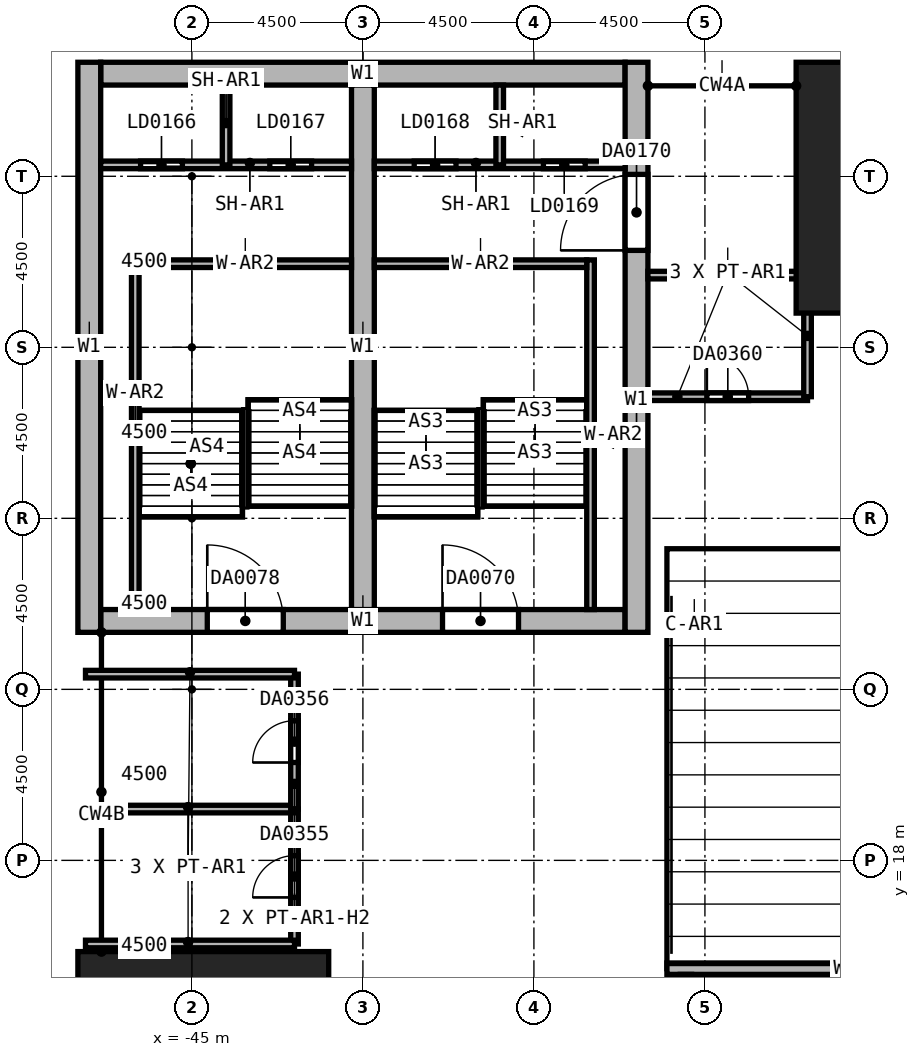
"""IFC4 building model, lengths in metres.
Left out: names, types, materials, properties, quantities, classifications, styles, units other than length and angle.
Written with IfcOpenShell. Run it as: python <this file> out.ifc"""

import sys

from ifc_helpers import new_model, si_unit, direction, frame, frame_2d, origin, origin_2d, place, context, subcontext, project, spatial, rectangle, hollow_rectangle, extrude, element, fill, save


model = new_model("IFC4")
c1 = context("Model", 3, precision=1e-05, world=origin(), true_north=direction((0.0, 1.0)))
c2 = subcontext(c1, "Body", "Model", "MODEL_VIEW")
j1 = project(units=[si_unit("LENGTHUNIT", "METRE"), si_unit("PLANEANGLEUNIT", "RADIAN")], contexts=[c1])
p1 = place(None, origin())
s1 = spatial("IfcSite", under=j1, at=p1, CompositionType="ELEMENT")
p2 = place(p1, origin())
s2 = spatial("IfcBuilding", under=s1, at=p2, CompositionType="ELEMENT")
p3 = place(p2, frame((0.0, 0.0, 12.0)))
s3 = spatial("IfcBuildingStorey", under=s2, at=p3, CompositionType="ELEMENT", Elevation=12.0)
for number, where, z_axis, x_axis in (
    (1, (-27.0, 35.7, 0.0), (0.0, 0.0, 1.0), (1.0, 0.0, 0.0)),
    (2, (-44.7, 13.5, 0.0), (0.0, 0.0, 1.0), (0.0, 1.0, 0.0)),
):
    element("IfcColumn", number, at=place(p3, frame(where, z_axis=z_axis, x_axis=x_axis)), inside=s3, PredefinedType="COLUMN", context=c2, shape_type="SweptSolid", body=[
        extrude(rectangle(XDim=4.2, YDim=6.6, at=origin_2d()), origin(), (0.0, 0.0, 1.0), 7.0),
    ])
p4 = place(p3, frame((-47.4, 38.7, 0.0), z_axis=(0.0, 0.0, 1.0), x_axis=(1.0, 0.0, 0.0)))
e3 = element("IfcWall", 3, at=p4, inside=s3, PredefinedType="SHEAR", context=c2, shape_type="SweptSolid", body=[
    extrude(rectangle(XDim=13.8, YDim=0.6, at=frame_2d((6.9, 0.0))), origin(), (0.0, 0.0, 1.0), 7.0),
])
p5 = place(p3, frame((-47.4, 24.3, 0.0), z_axis=(0.0, 0.0, 1.0), x_axis=(1.0, 0.0, 0.0)))
e4 = element("IfcWall", 4, at=p5, inside=s3, PredefinedType="SHEAR", context=c2, shape_type="SweptSolid", body=[
    extrude(rectangle(XDim=13.8, YDim=0.6, at=frame_2d((6.9, 0.0))), origin(), (0.0, 0.0, 1.0), 7.0),
])
p6 = place(p5, frame((8.995, 0.0, 0.0)))
e5 = element("IfcOpeningElement", 5, at=p6, cuts=e4, PredefinedType="OPENING", context=c2, shape_type="SweptSolid", body=[
    extrude(rectangle(XDim=2.0, YDim=2.4, at=frame_2d((1.0, 1.2))), frame((0.0, 0.3, 0.0), z_axis=(0.0, -1.0, 0.0), x_axis=(1.0, 0.0, 0.0)), (0.0, 0.0, 1.0), 0.6),
])
p7 = place(p5, frame((2.805, 0.0, 0.0)))
e6 = element("IfcOpeningElement", 6, at=p7, cuts=e4, PredefinedType="OPENING", context=c2, shape_type="SweptSolid", body=[
    extrude(rectangle(XDim=2.0, YDim=2.4, at=frame_2d((1.0, 1.2))), frame((0.0, 0.3, 0.0), z_axis=(0.0, -1.0, 0.0), x_axis=(1.0, 0.0, 0.0)), (0.0, 0.0, 1.0), 0.6),
])
p8 = place(p3, frame((-47.7, 24.0, 0.0), z_axis=(0.0, 0.0, 1.0), x_axis=(0.0, 1.0, 0.0)))
e7 = element("IfcWall", 7, at=p8, inside=s3, PredefinedType="SHEAR", context=c2, shape_type="SweptSolid", body=[
    extrude(rectangle(XDim=15.0, YDim=0.6, at=frame_2d((7.5, 0.0))), origin(), (0.0, 0.0, 1.0), 7.0),
])
p9 = place(p3, frame((-33.3, 24.0, 0.0), z_axis=(0.0, 0.0, 1.0), x_axis=(0.0, 1.0, 0.0)))
e8 = element("IfcWall", 8, at=p9, inside=s3, PredefinedType="SHEAR", context=c2, shape_type="SweptSolid", body=[
    extrude(rectangle(XDim=15.0, YDim=0.6, at=frame_2d((7.5, 0.0))), origin(), (0.0, 0.0, 1.0), 7.0),
])
p10 = place(p9, frame((10.05, 0.0, 0.0)))
e9 = element("IfcOpeningElement", 9, at=p10, cuts=e8, PredefinedType="OPENING", context=c2, shape_type="SweptSolid", body=[
    extrude(rectangle(XDim=2.0, YDim=2.4, at=frame_2d((1.0, 1.2))), frame((0.0, 0.3, 0.0), z_axis=(0.0, -1.0, 0.0), x_axis=(1.0, 0.0, 0.0)), (0.0, 0.0, 1.0), 0.6),
])
p11 = place(p3, frame((-40.5, 24.6, 0.0), z_axis=(0.0, 0.0, 1.0), x_axis=(0.0, 1.0, 0.0)))
e10 = element("IfcWall", 10, at=p11, inside=s3, PredefinedType="SHEAR", context=c2, shape_type="SweptSolid", body=[
    extrude(rectangle(XDim=13.8, YDim=0.6, at=frame_2d((6.9, 0.0))), origin(), (0.0, 0.0, 1.0), 7.0),
])
p12 = place(p3, frame((-32.5, 15.15, 0.0), z_axis=(0.0, 0.0, 1.0), x_axis=(1.0, 0.0, 0.0)))
e11 = element("IfcWall", 11, at=p12, inside=s3, PredefinedType="SOLIDWALL", context=c2, shape_type="SweptSolid", body=[
    extrude(rectangle(XDim=10.6, YDim=0.3, at=frame_2d((5.3, 0.0))), origin(), (0.0, 0.0, 1.0), 2.125),
])
p13 = place(p3, frame((-32.0, 15.0, 0.0), z_axis=(0.0, 0.0, 1.0), x_axis=(0.0, -1.0, 0.0)))
e12 = element("IfcWall", 12, at=p13, inside=s3, PredefinedType="SOLIDWALL", context=c2, shape_type="SweptSolid", body=[
    extrude(rectangle(XDim=13.05, YDim=0.3, at=frame_2d((6.525, 0.0))), origin(), (0.0, 0.0, 1.0), 2.0),
])
p14 = place(p3, frame((-31.78, 24.2, 0.0), z_axis=(0.0, 0.0, 1.0), x_axis=(1.0, 0.0, 0.0)))
e13 = element("IfcColumn", 13, at=p14, inside=s3, PredefinedType="COLUMN", context=c2, shape_type="SweptSolid", body=[
    extrude(hollow_rectangle(XDim=0.5, YDim=0.6, WallThickness=0.03, at=origin_2d()), origin(), (0.0, 0.0, 1.0), 5.712),
])
p15 = place(p3, frame((-34.51, 24.6, 0.0), z_axis=(0.0, 0.0, 1.0), x_axis=(0.0, 1.0, 0.0)))
e14 = element("IfcWall", 14, at=p15, inside=s3, PredefinedType="SOLIDWALL", context=c2, shape_type="SweptSolid", body=[
    extrude(rectangle(XDim=9.2, YDim=0.2, at=frame_2d((4.6, 0.0))), origin(), (0.0, 0.0, 1.0), 7.0),
])
p16 = place(p3, frame((-40.2, 33.7, 0.0), z_axis=(0.0, 0.0, 1.0), x_axis=(1.0, 0.0, 0.0)))
e15 = element("IfcWall", 15, at=p16, inside=s3, PredefinedType="SOLIDWALL", context=c2, shape_type="SweptSolid", body=[
    extrude(rectangle(XDim=5.59, YDim=0.2, at=frame_2d((2.795, 0.0))), origin(), (0.0, 0.0, 1.0), 7.0),
])
p17 = place(p3, frame((-46.49, 24.6, 0.0), z_axis=(0.0, 0.0, 1.0), x_axis=(0.0, 1.0, 0.0)))
e16 = element("IfcWall", 16, at=p17, inside=s3, PredefinedType="SOLIDWALL", context=c2, shape_type="SweptSolid", body=[
    extrude(rectangle(XDim=9.2, YDim=0.2, at=frame_2d((4.6, 0.0))), origin(), (0.0, 0.0, 1.0), 7.0),
])
p18 = place(p3, frame((-46.39, 33.7, 0.0), z_axis=(0.0, 0.0, 1.0), x_axis=(1.0, 0.0, 0.0)))
e17 = element("IfcWall", 17, at=p18, inside=s3, PredefinedType="SOLIDWALL", context=c2, shape_type="SweptSolid", body=[
    extrude(rectangle(XDim=5.59, YDim=0.2, at=frame_2d((2.795, 0.0))), origin(), (0.0, 0.0, 1.0), 7.0),
])
p19 = place(p3, frame((-47.4, 36.3, 0.0), z_axis=(0.0, 0.0, 1.0), x_axis=(1.0, 0.0, 0.0)))
e18 = element("IfcWall", 18, at=p19, inside=s3, PredefinedType="SHEAR", context=c2, shape_type="SweptSolid", body=[
    extrude(rectangle(XDim=6.6, YDim=0.2, at=frame_2d((3.3, 0.0))), origin(), (0.0, 0.0, 1.0), 7.0),
])
p20 = place(p19, frame((1.05, 0.0, 0.0)))
e19 = element("IfcOpeningElement", 19, at=p20, cuts=e18, PredefinedType="OPENING", context=c2, shape_type="SweptSolid", body=[
    extrude(rectangle(XDim=1.1, YDim=2.4, at=frame_2d((0.55, 1.2))), frame((0.0, 0.1, 0.0), z_axis=(0.0, -1.0, 0.0), x_axis=(1.0, 0.0, 0.0)), (0.0, 0.0, 1.0), 0.2),
])
p21 = place(p19, frame((4.45, 0.0, 0.0)))
e20 = element("IfcOpeningElement", 20, at=p21, cuts=e18, PredefinedType="OPENING", context=c2, shape_type="SweptSolid", body=[
    extrude(rectangle(XDim=1.1, YDim=2.4, at=frame_2d((0.55, 1.2))), frame((0.0, 0.1, 0.0), z_axis=(0.0, -1.0, 0.0), x_axis=(1.0, 0.0, 0.0)), (0.0, 0.0, 1.0), 0.2),
])
p22 = place(p3, frame((-40.2, 36.3, 0.0), z_axis=(0.0, 0.0, 1.0), x_axis=(1.0, 0.0, 0.0)))
e21 = element("IfcWall", 21, at=p22, inside=s3, PredefinedType="SHEAR", context=c2, shape_type="SweptSolid", body=[
    extrude(rectangle(XDim=6.6, YDim=0.2, at=frame_2d((3.3, 0.0))), origin(), (0.0, 0.0, 1.0), 7.0),
])
p23 = place(p22, frame((1.05, 0.0, 0.0)))
e22 = element("IfcOpeningElement", 22, at=p23, cuts=e21, PredefinedType="OPENING", context=c2, shape_type="SweptSolid", body=[
    extrude(rectangle(XDim=1.1, YDim=2.4, at=frame_2d((0.55, 1.2))), frame((0.0, 0.1, 0.0), z_axis=(0.0, -1.0, 0.0), x_axis=(1.0, 0.0, 0.0)), (0.0, 0.0, 1.0), 0.2),
])
p24 = place(p22, frame((4.45, 0.0, 0.0)))
e23 = element("IfcOpeningElement", 23, at=p24, cuts=e21, PredefinedType="OPENING", context=c2, shape_type="SweptSolid", body=[
    extrude(rectangle(XDim=1.1, YDim=2.4, at=frame_2d((0.55, 1.2))), frame((0.0, 0.1, 0.0), z_axis=(0.0, -1.0, 0.0), x_axis=(1.0, 0.0, 0.0)), (0.0, 0.0, 1.0), 0.2),
])
for number, where, z_axis, x_axis in (
    (24, (-36.9, 36.3, 0.0), (0.0, 0.0, 1.0), (0.0, 1.0, 0.0)),
    (25, (-44.1, 36.3, 0.0), (0.0, 0.0, 1.0), (0.0, 1.0, 0.0)),
):
    element("IfcWall", number, at=place(p3, frame(where, z_axis=z_axis, x_axis=x_axis)), inside=s3, PredefinedType="SHEAR", context=c2, shape_type="SweptSolid", body=[
        extrude(rectangle(XDim=2.1, YDim=0.2, at=frame_2d((1.05, 0.0))), origin(), (0.0, 0.0, 1.0), 7.0),
    ])
p25 = place(p3, frame((-42.3, 15.8, 0.0), z_axis=(0.0, 0.0, 1.0), x_axis=(0.0, 1.0, 0.0)))
e26 = element("IfcWall", 26, at=p25, inside=s3, PredefinedType="PARTITIONING", context=c2, shape_type="SweptSolid", body=[
    extrude(rectangle(XDim=3.55, YDim=0.2, at=frame_2d((1.775, 0.0))), origin(), (0.0, 0.0, 1.0), 5.5),
])
p26 = place(p25, frame((1.225, 0.0, 0.0)))
e27 = element("IfcOpeningElement", 27, at=p26, cuts=e26, PredefinedType="OPENING", context=c2, shape_type="SweptSolid", body=[
    extrude(rectangle(XDim=1.1, YDim=2.4, at=frame_2d((0.55, 1.2))), frame((0.0, 0.1, 0.0), z_axis=(0.0, -1.0, 0.0), x_axis=(1.0, 0.0, 0.0)), (0.0, 0.0, 1.0), 0.2),
])
for number, where, z_axis, x_axis in (
    (28, (-42.3, 15.8, 0.0), (0.0, 0.0, 1.0), (-1.0, 0.0, 0.0)),
    (29, (-47.8, 19.35, 0.0), (0.0, 0.0, 1.0), (1.0, 0.0, 0.0)),
):
    element("IfcWall", number, at=place(p3, frame(where, z_axis=z_axis, x_axis=x_axis)), inside=s3, PredefinedType="PARTITIONING", context=c2, shape_type="SweptSolid", body=[
        extrude(rectangle(XDim=5.5, YDim=0.2, at=frame_2d((2.75, 0.0))), origin(), (0.0, 0.0, 1.0), 6.7),
    ])
p27 = place(p3, frame((-42.3, 19.35, 0.0), z_axis=(0.0, 0.0, 1.0), x_axis=(0.0, 1.0, 0.0)))
e30 = element("IfcWall", 30, at=p27, inside=s3, PredefinedType="PARTITIONING", context=c2, shape_type="SweptSolid", body=[
    extrude(rectangle(XDim=3.55, YDim=0.2, at=frame_2d((1.775, 0.0))), origin(), (0.0, 0.0, 1.0), 5.5),
])
p28 = place(p27, frame((1.225, 0.0, 0.0)))
e31 = element("IfcOpeningElement", 31, at=p28, cuts=e30, PredefinedType="OPENING", context=c2, shape_type="SweptSolid", body=[
    extrude(rectangle(XDim=1.1, YDim=2.4, at=frame_2d((0.55, 1.2))), frame((0.0, 0.1, 0.0), z_axis=(0.0, -1.0, 0.0), x_axis=(1.0, 0.0, 0.0)), (0.0, 0.0, 1.0), 0.2),
])
p29 = place(p3, frame((-42.3, 22.9, 0.0), z_axis=(0.0, 0.0, 1.0), x_axis=(-1.0, 0.0, 0.0)))
e32 = element("IfcWall", 32, at=p29, inside=s3, PredefinedType="PARTITIONING", context=c2, shape_type="SweptSolid", body=[
    extrude(rectangle(XDim=5.5, YDim=0.2, at=frame_2d((2.75, 0.0))), origin(), (0.0, 0.0, 1.0), 6.7),
])
p30 = place(p3, frame((-33.0, 30.2, 0.0), z_axis=(0.0, 0.0, 1.0), x_axis=(1.0, 0.0, 0.0)))
e33 = element("IfcWall", 33, at=p30, inside=s3, PredefinedType="PARTITIONING", context=c2, shape_type="SweptSolid", body=[
    extrude(rectangle(XDim=4.2, YDim=0.2, at=frame_2d((2.1, 0.0))), origin(), (0.0, 0.0, 1.0), 6.7),
])
p31 = place(p30, frame((1.55, 0.0, 0.0)))
e34 = element("IfcOpeningElement", 34, at=p31, cuts=e33, PredefinedType="OPENING", context=c2, shape_type="SweptSolid", body=[
    extrude(rectangle(XDim=1.1, YDim=2.4, at=frame_2d((0.55, 1.2))), frame((0.0, 0.1, 0.0), z_axis=(0.0, -1.0, 0.0), x_axis=(1.0, 0.0, 0.0)), (0.0, 0.0, 1.0), 0.2),
])
p32 = place(p3, frame((-28.8, 30.2, 0.0), z_axis=(0.0, 0.0, 1.0), x_axis=(0.0, 1.0, 0.0)))
e35 = element("IfcWall", 35, at=p32, inside=s3, PredefinedType="PARTITIONING", context=c2, shape_type="SweptSolid", body=[
    extrude(rectangle(XDim=3.2, YDim=0.2, at=frame_2d((1.6, 0.0))), origin(), (0.0, 0.0, 1.0), 6.7),
])
p33 = place(p3, frame((-33.0, 33.4, 0.0), z_axis=(0.0, 0.0, 1.0), x_axis=(1.0, 0.0, 0.0)))
e36 = element("IfcWall", 36, at=p33, inside=s3, PredefinedType="PARTITIONING", context=c2, shape_type="SweptSolid", body=[
    extrude(rectangle(XDim=4.2, YDim=0.2, at=frame_2d((2.1, 0.0))), origin(), (0.0, 0.0, 1.0), 6.7),
])
p34 = place(p6, origin())
e37 = element("IfcDoor", 37, at=p34, inside=s3, OperationType="DOUBLE_DOOR_SINGLE_SWING", PredefinedType="DOOR", context=c2, shape_type="SweptSolid", body=[
    extrude(rectangle(XDim=2.0, YDim=2.4, at=frame_2d((1.0, 1.2))), frame((0.0, 0.025, 0.0), z_axis=(0.0, -1.0, 0.0), x_axis=(1.0, 0.0, 0.0)), (0.0, 0.0, 1.0), 0.05),
])
fill(e5, e37)
p35 = place(p7, origin())
e38 = element("IfcDoor", 38, at=p35, inside=s3, OperationType="DOUBLE_DOOR_SINGLE_SWING", PredefinedType="DOOR", context=c2, shape_type="SweptSolid", body=[
    extrude(rectangle(XDim=2.0, YDim=2.4, at=frame_2d((1.0, 1.2))), frame((0.0, 0.025, 0.0), z_axis=(0.0, -1.0, 0.0), x_axis=(1.0, 0.0, 0.0)), (0.0, 0.0, 1.0), 0.05),
])
fill(e6, e38)
p36 = place(p20, origin())
e39 = element("IfcDoor", 39, at=p36, inside=s3, OperationType="DOUBLE_DOOR_SLIDING", PredefinedType="DOOR", context=c2, shape_type="SweptSolid", body=[
    extrude(rectangle(XDim=1.1, YDim=2.4, at=frame_2d((0.55, 1.2))), frame((0.0, 0.025, 0.0), z_axis=(0.0, -1.0, 0.0), x_axis=(1.0, 0.0, 0.0)), (0.0, 0.0, 1.0), 0.05),
])
fill(e19, e39)
p37 = place(p21, origin())
e40 = element("IfcDoor", 40, at=p37, inside=s3, OperationType="DOUBLE_DOOR_SLIDING", PredefinedType="DOOR", context=c2, shape_type="SweptSolid", body=[
    extrude(rectangle(XDim=1.1, YDim=2.4, at=frame_2d((0.55, 1.2))), frame((0.0, 0.025, 0.0), z_axis=(0.0, -1.0, 0.0), x_axis=(1.0, 0.0, 0.0)), (0.0, 0.0, 1.0), 0.05),
])
fill(e20, e40)
p38 = place(p23, origin())
e41 = element("IfcDoor", 41, at=p38, inside=s3, OperationType="DOUBLE_DOOR_SLIDING", PredefinedType="DOOR", context=c2, shape_type="SweptSolid", body=[
    extrude(rectangle(XDim=1.1, YDim=2.4, at=frame_2d((0.55, 1.2))), frame((0.0, 0.025, 0.0), z_axis=(0.0, -1.0, 0.0), x_axis=(1.0, 0.0, 0.0)), (0.0, 0.0, 1.0), 0.05),
])
fill(e22, e41)
p39 = place(p24, origin())
e42 = element("IfcDoor", 42, at=p39, inside=s3, OperationType="DOUBLE_DOOR_SLIDING", PredefinedType="DOOR", context=c2, shape_type="SweptSolid", body=[
    extrude(rectangle(XDim=1.1, YDim=2.4, at=frame_2d((0.55, 1.2))), frame((0.0, 0.025, 0.0), z_axis=(0.0, -1.0, 0.0), x_axis=(1.0, 0.0, 0.0)), (0.0, 0.0, 1.0), 0.05),
])
fill(e23, e42)
p40 = place(p10, origin())
e43 = element("IfcDoor", 43, at=p40, inside=s3, OperationType="DOUBLE_DOOR_SINGLE_SWING", PredefinedType="DOOR", context=c2, shape_type="SweptSolid", body=[
    extrude(rectangle(XDim=2.0, YDim=2.4, at=frame_2d((1.0, 1.2))), frame((0.0, 0.025, 0.0), z_axis=(0.0, -1.0, 0.0), x_axis=(1.0, 0.0, 0.0)), (0.0, 0.0, 1.0), 0.05),
])
fill(e9, e43)
p41 = place(p26, origin())
e44 = element("IfcDoor", 44, at=p41, inside=s3, OperationType="DOUBLE_DOOR_SINGLE_SWING", PredefinedType="DOOR", context=c2, shape_type="SweptSolid", body=[
    extrude(rectangle(XDim=1.1, YDim=2.4, at=frame_2d((0.55, 1.2))), frame((0.0, 0.025, 0.0), z_axis=(0.0, -1.0, 0.0), x_axis=(1.0, 0.0, 0.0)), (0.0, 0.0, 1.0), 0.05),
])
fill(e27, e44)
p42 = place(p28, origin())
e45 = element("IfcDoor", 45, at=p42, inside=s3, OperationType="DOUBLE_DOOR_SINGLE_SWING", PredefinedType="DOOR", context=c2, shape_type="SweptSolid", body=[
    extrude(rectangle(XDim=1.1, YDim=2.4, at=frame_2d((0.55, 1.2))), frame((0.0, 0.025, 0.0), z_axis=(0.0, -1.0, 0.0), x_axis=(1.0, 0.0, 0.0)), (0.0, 0.0, 1.0), 0.05),
])
fill(e31, e45)
p43 = place(p31, origin())
e46 = element("IfcDoor", 46, at=p43, inside=s3, OperationType="DOUBLE_DOOR_SINGLE_SWING", PredefinedType="DOOR", context=c2, shape_type="SweptSolid", body=[
    extrude(rectangle(XDim=1.1, YDim=2.4, at=frame_2d((0.55, 1.2))), frame((0.0, 0.025, 0.0), z_axis=(0.0, -1.0, 0.0), x_axis=(1.0, 0.0, 0.0)), (0.0, 0.0, 1.0), 0.05),
])
fill(e34, e46)
save(model, sys.argv[1])
